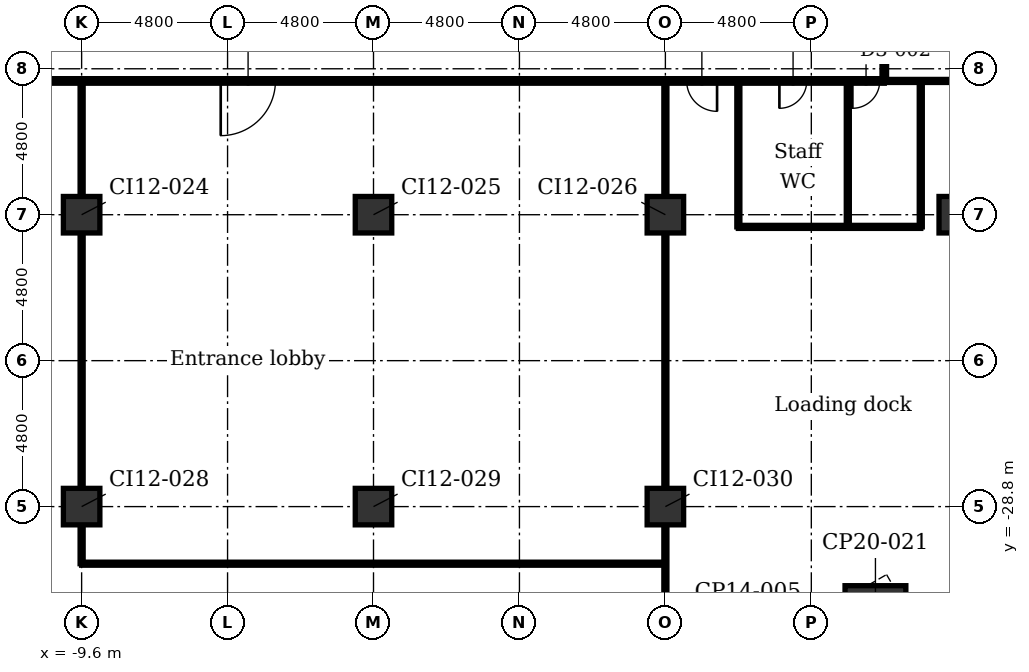
"""IFC4 building model, lengths in metres.
Left out: names, types, materials, properties, quantities, classifications, styles, units other than length and angle.
Written with IfcOpenShell. Run it as: python <this file> out.ifc"""

import sys

from ifc_helpers import new_model, si_unit, direction, frame, frame_2d, origin, origin_2d, place, context, subcontext, project, spatial, rectangle, extrude, element, fill, save


model = new_model("IFC4")
c1 = context("Model", 3, precision=1e-05, world=origin(), true_north=direction((0.0, 1.0)))
c2 = subcontext(c1, "Body", "Model", "MODEL_VIEW")
j1 = project(units=[si_unit("LENGTHUNIT", "METRE"), si_unit("PLANEANGLEUNIT", "RADIAN")], contexts=[c1])
p1 = place(None, origin())
s1 = spatial("IfcSite", under=j1, at=p1, CompositionType="ELEMENT")
p2 = place(p1, origin())
s2 = spatial("IfcBuilding", under=s1, at=p2, CompositionType="ELEMENT")
p3 = place(p2, origin())
s3 = spatial("IfcBuildingStorey", under=s2, at=p3, CompositionType="ELEMENT", Elevation=0.0)
p4 = place(p3, frame((16.509, -32.401, -0.4), z_axis=(0.0, 0.0, 1.0), x_axis=(0.866025403784, 0.5, 0.0)))
e1 = element("IfcColumn", 1, at=p4, inside=s3, PredefinedType="COLUMN", context=c2, shape_type="SweptSolid", body=[
    extrude(rectangle(XDim=2.0, YDim=2.0, at=origin_2d()), origin(), (0.0, 0.0, 1.0), 7.1),
])
for number, where, z_axis, x_axis in (
    (2, (-9.6, -28.8, -0.4), (0.0, 0.0, 1.0), (1.0, 0.0, 0.0)),
    (3, (-9.6, -19.2, -0.4), (0.0, 0.0, 1.0), (1.0, 0.0, 0.0)),
    (4, (0.0, -28.8, -0.4), (0.0, 0.0, 1.0), (1.0, 0.0, 0.0)),
    (5, (0.0, -19.2, -0.4), (0.0, 0.0, 1.0), (1.0, 0.0, 0.0)),
    (6, (9.6, -28.8, -0.4), (0.0, 0.0, 1.0), (1.0, 0.0, 0.0)),
    (7, (9.6, -19.2, -0.4), (0.0, 0.0, 1.0), (1.0, 0.0, 0.0)),
    (8, (19.2, -19.2, -0.4), (0.0, 0.0, 1.0), (1.0, 0.0, 0.0)),
):
    element("IfcColumn", number, at=place(p3, frame(where, z_axis=z_axis, x_axis=x_axis)), inside=s3, PredefinedType="COLUMN", context=c2, shape_type="SweptSolid", body=[
        extrude(rectangle(XDim=1.2, YDim=1.2, at=origin_2d()), origin(), (0.0, 0.0, 1.0), 7.1),
    ])
p5 = place(p3, frame((18.0, -19.6, 0.0), z_axis=(0.0, 0.0, 1.0), x_axis=(0.0, 1.0, 0.0)))
e9 = element("IfcWall", 9, at=p5, inside=s3, PredefinedType="PARTITIONING", context=c2, shape_type="SweptSolid", body=[
    extrude(rectangle(XDim=4.8, YDim=0.1, at=frame_2d((2.4, 0.0))), origin(), (0.0, 0.0, 1.0), 6.7),
])
p6 = place(p3, frame((16.8, -14.8, 0.0), z_axis=(0.0, 0.0, 1.0), x_axis=(0.0, 1.0, 0.0)))
e10 = element("IfcWall", 10, at=p6, inside=s3, PredefinedType="PARTITIONING", context=c2, shape_type="SweptSolid", body=[
    extrude(rectangle(XDim=10.85, YDim=0.15, at=frame_2d((5.425, 0.0))), origin(), (0.0, 0.0, 1.0), 6.7),
])
p7 = place(p6, frame((1.9, 0.0, 0.0)))
e11 = element("IfcOpeningElement", 11, at=p7, cuts=e10, PredefinedType="OPENING", context=c2, shape_type="SweptSolid", body=[
    extrude(rectangle(XDim=1.0, YDim=2.1, at=frame_2d((0.5, 1.05))), frame((0.0, 0.085, 0.0), z_axis=(0.0, -1.0, 0.0), x_axis=(1.0, 0.0, 0.0)), (0.0, 0.0, 1.0), 0.17),
])
p8 = place(p6, frame((8.9, 0.0, 0.0)))
e12 = element("IfcOpeningElement", 12, at=p8, cuts=e10, PredefinedType="OPENING", context=c2, shape_type="SweptSolid", body=[
    extrude(rectangle(XDim=1.0, YDim=2.1, at=frame_2d((0.5, 1.05))), frame((0.0, 0.085, 0.0), z_axis=(0.0, -1.0, 0.0), x_axis=(1.0, 0.0, 0.0)), (0.0, 0.0, 1.0), 0.17),
])
for number, where, z_axis, x_axis in (
    (13, (15.6, -19.6, 0.0), (0.0, 0.0, 1.0), (0.0, 1.0, 0.0)),
    (14, (12.0, -19.6, 0.0), (0.0, 0.0, 1.0), (0.0, 1.0, 0.0)),
):
    element("IfcWall", number, at=place(p3, frame(where, z_axis=z_axis, x_axis=x_axis)), inside=s3, PredefinedType="PARTITIONING", context=c2, shape_type="SweptSolid", body=[
        extrude(rectangle(XDim=4.8, YDim=0.1, at=frame_2d((2.4, 0.0))), origin(), (0.0, 0.0, 1.0), 6.7),
    ])
p9 = place(p3, frame((9.6, -28.24, 0.0), z_axis=(0.0, 0.0, 1.0), x_axis=(0.0, 1.0, 0.0)))
e15 = element("IfcWall", 15, at=p9, inside=s3, PredefinedType="PARTITIONING", context=c2, shape_type="SweptSolid", body=[
    extrude(rectangle(XDim=8.48, YDim=0.1, at=frame_2d((4.24, 0.0))), origin(), (0.0, 0.0, 1.0), 6.293),
])
p10 = place(p3, frame((9.6, -31.896, 0.0), z_axis=(0.0, 0.0, 1.0), x_axis=(0.0, 1.0, 0.0)))
e16 = element("IfcWall", 16, at=p10, inside=s3, PredefinedType="PARTITIONING", context=c2, shape_type="SweptSolid", body=[
    extrude(rectangle(XDim=2.535, YDim=0.1, at=frame_2d((1.268, 0.0))), origin(), (0.0, 0.0, 1.0), 6.39),
])
for number, where, z_axis, x_axis in (
    (17, (9.6, -29.36, 0.0), (0.0, 0.0, 1.0), (0.0, 1.0, 0.0)),
    (18, (9.6, -19.76, 0.0), (0.0, 0.0, 1.0), (0.0, 1.0, 0.0)),
):
    element("IfcWall", number, at=place(p3, frame(where, z_axis=z_axis, x_axis=x_axis)), inside=s3, PredefinedType="PARTITIONING", context=c2, shape_type="SweptSolid", body=[
        extrude(rectangle(XDim=1.12, YDim=0.1, at=frame_2d((0.56, 0.0))), origin(), (0.0, 0.0, 1.0), 6.7),
    ])
p11 = place(p3, frame((9.6, -18.64, 0.0), z_axis=(0.0, 0.0, 1.0), x_axis=(0.0, 1.0, 0.0)))
e19 = element("IfcWall", 19, at=p11, inside=s3, PredefinedType="PARTITIONING", context=c2, shape_type="SweptSolid", body=[
    extrude(rectangle(XDim=3.84, YDim=0.1, at=frame_2d((1.92, 0.0))), origin(), (0.0, 0.0, 1.0), 6.293),
])
p12 = place(p3, frame((-9.6, -28.24, 0.0), z_axis=(0.0, 0.0, 1.0), x_axis=(0.0, 1.0, 0.0)))
e20 = element("IfcWall", 20, at=p12, inside=s3, PredefinedType="PARTITIONING", context=c2, shape_type="SweptSolid", body=[
    extrude(rectangle(XDim=8.48, YDim=0.1, at=frame_2d((4.24, 0.0))), origin(), (0.0, 0.0, 1.0), 6.293),
])
p13 = place(p3, frame((-9.6, -30.678, 0.0), z_axis=(0.0, 0.0, 1.0), x_axis=(0.0, 1.0, 0.0)))
e21 = element("IfcWall", 21, at=p13, inside=s3, PredefinedType="PARTITIONING", context=c2, shape_type="SweptSolid", body=[
    extrude(rectangle(XDim=1.318, YDim=0.1, at=frame_2d((0.659, 0.0))), origin(), (0.0, 0.0, 1.0), 6.39),
])
for number, where, z_axis, x_axis in (
    (22, (-9.6, -29.36, 0.0), (0.0, 0.0, 1.0), (0.0, 1.0, 0.0)),
    (23, (-9.6, -19.76, 0.0), (0.0, 0.0, 1.0), (0.0, 1.0, 0.0)),
):
    element("IfcWall", number, at=place(p3, frame(where, z_axis=z_axis, x_axis=x_axis)), inside=s3, PredefinedType="PARTITIONING", context=c2, shape_type="SweptSolid", body=[
        extrude(rectangle(XDim=1.12, YDim=0.1, at=frame_2d((0.56, 0.0))), origin(), (0.0, 0.0, 1.0), 6.7),
    ])
p14 = place(p3, frame((-9.6, -18.64, 0.0), z_axis=(0.0, 0.0, 1.0), x_axis=(0.0, 1.0, 0.0)))
e24 = element("IfcWall", 24, at=p14, inside=s3, PredefinedType="PARTITIONING", context=c2, shape_type="SweptSolid", body=[
    extrude(rectangle(XDim=3.84, YDim=0.1, at=frame_2d((1.92, 0.0))), origin(), (0.0, 0.0, 1.0), 6.293),
])
p15 = place(p3, frame((-9.6, -30.678, 0.0), z_axis=(0.0, 0.0, 1.0), x_axis=(1.0, 0.0, 0.0)))
e25 = element("IfcWall", 25, at=p15, inside=s3, PredefinedType="PARTITIONING", context=c2, shape_type="SweptSolid", body=[
    extrude(rectangle(XDim=19.2, YDim=0.1, at=frame_2d((9.6, 0.0))), origin(), (0.0, 0.0, 1.0), 6.7),
])
p16 = place(p3, frame((12.0, -19.6, 0.0), z_axis=(0.0, 0.0, 1.0), x_axis=(1.0, 0.0, 0.0)))
e26 = element("IfcWall", 26, at=p16, inside=s3, PredefinedType="PARTITIONING", context=c2, shape_type="SweptSolid", body=[
    extrude(rectangle(XDim=6.0, YDim=0.1, at=frame_2d((3.0, 0.0))), origin(), (0.0, 0.0, 1.0), 6.7),
])
p17 = place(p3, frame((16.8, -14.8, 0.0), z_axis=(0.0, 0.0, 1.0), x_axis=(1.0, 0.0, 0.0)))
e27 = element("IfcWall", 27, at=p17, inside=s3, PredefinedType="PARTITIONING", context=c2, shape_type="SweptSolid", body=[
    extrude(rectangle(XDim=4.8, YDim=0.1, at=frame_2d((2.4, 0.0))), origin(), (0.0, 0.0, 1.0), 6.7),
])
p18 = place(p3, frame((-16.8, -14.8, 0.0), z_axis=(0.0, 0.0, 1.0), x_axis=(1.0, 0.0, 0.0)))
e28 = element("IfcWall", 28, at=p18, inside=s3, PredefinedType="PARTITIONING", context=c2, shape_type="SweptSolid", body=[
    extrude(rectangle(XDim=33.6, YDim=0.15, at=frame_2d((16.8, 0.0))), origin(), (0.0, 0.0, 1.0), 6.7),
])
p19 = place(p18, frame((30.15, 0.0, 0.0)))
e29 = element("IfcOpeningElement", 29, at=p19, cuts=e28, PredefinedType="OPENING", context=c2, shape_type="SweptSolid", body=[
    extrude(rectangle(XDim=0.9, YDim=2.1, at=frame_2d((0.45, 1.05))), frame((0.0, 0.085, 0.0), z_axis=(0.0, -1.0, 0.0), x_axis=(1.0, 0.0, 0.0)), (0.0, 0.0, 1.0), 0.17),
])
p20 = place(p18, frame((32.55, 0.0, 0.0)))
e30 = element("IfcOpeningElement", 30, at=p20, cuts=e28, PredefinedType="OPENING", context=c2, shape_type="SweptSolid", body=[
    extrude(rectangle(XDim=0.9, YDim=2.1, at=frame_2d((0.45, 1.05))), frame((0.0, 0.085, 0.0), z_axis=(0.0, -1.0, 0.0), x_axis=(1.0, 0.0, 0.0)), (0.0, 0.0, 1.0), 0.17),
])
p21 = place(p18, frame((2.025, 0.0, 0.0)))
e31 = element("IfcOpeningElement", 31, at=p21, cuts=e28, PredefinedType="OPENING", context=c2, shape_type="SweptSolid", body=[
    extrude(rectangle(XDim=1.8, YDim=2.1, at=frame_2d((0.9, 1.05))), frame((0.0, 0.085, 0.0), z_axis=(0.0, -1.0, 0.0), x_axis=(1.0, 0.0, 0.0)), (0.0, 0.0, 1.0), 0.17),
])
p22 = place(p18, frame((11.775, 0.0, 0.0)))
e32 = element("IfcOpeningElement", 32, at=p22, cuts=e28, PredefinedType="OPENING", context=c2, shape_type="SweptSolid", body=[
    extrude(rectangle(XDim=1.8, YDim=2.1, at=frame_2d((0.9, 1.05))), frame((0.0, 0.085, 0.0), z_axis=(0.0, -1.0, 0.0), x_axis=(1.0, 0.0, 0.0)), (0.0, 0.0, 1.0), 0.17),
])
p23 = place(p18, frame((27.1, 0.0, 0.0)))
e33 = element("IfcOpeningElement", 33, at=p23, cuts=e28, PredefinedType="OPENING", context=c2, shape_type="SweptSolid", body=[
    extrude(rectangle(XDim=1.0, YDim=2.1, at=frame_2d((0.5, 1.05))), frame((0.0, 0.085, 0.0), z_axis=(0.0, -1.0, 0.0), x_axis=(1.0, 0.0, 0.0)), (0.0, 0.0, 1.0), 0.17),
])
p24 = place(p19, frame((0.9, 0.0, 0.0), z_axis=(0.0, 0.0, 1.0), x_axis=(-1.0, 0.0, 0.0)))
e34 = element("IfcDoor", 34, at=p24, inside=s3, OperationType="SINGLE_SWING_LEFT", PredefinedType="DOOR", context=c2, shape_type="SweptSolid", body=[
    extrude(rectangle(XDim=0.9, YDim=2.1, at=frame_2d((0.45, 1.05))), frame((0.0, 0.025, 0.0), z_axis=(0.0, -1.0, 0.0), x_axis=(1.0, 0.0, 0.0)), (0.0, 0.0, 1.0), 0.05),
])
fill(e29, e34)
p25 = place(p20, frame((0.9, 0.0, 0.0), z_axis=(0.0, 0.0, 1.0), x_axis=(-1.0, 0.0, 0.0)))
e35 = element("IfcDoor", 35, at=p25, inside=s3, OperationType="SINGLE_SWING_LEFT", PredefinedType="DOOR", context=c2, shape_type="SweptSolid", body=[
    extrude(rectangle(XDim=0.9, YDim=2.1, at=frame_2d((0.45, 1.05))), frame((0.0, 0.025, 0.0), z_axis=(0.0, -1.0, 0.0), x_axis=(1.0, 0.0, 0.0)), (0.0, 0.0, 1.0), 0.05),
])
fill(e30, e35)
p26 = place(p22, frame((1.8, 0.0, 0.0), z_axis=(0.0, 0.0, 1.0), x_axis=(-1.0, 0.0, 0.0)))
e36 = element("IfcDoor", 36, at=p26, inside=s3, OperationType="SINGLE_SWING_LEFT", PredefinedType="DOOR", context=c2, shape_type="SweptSolid", body=[
    extrude(rectangle(XDim=1.8, YDim=2.1, at=frame_2d((0.9, 1.05))), frame((0.0, 0.025, 0.0), z_axis=(0.0, -1.0, 0.0), x_axis=(1.0, 0.0, 0.0)), (0.0, 0.0, 1.0), 0.05),
])
fill(e32, e36)
p27 = place(p23, frame((1.0, 0.0, 0.0), z_axis=(0.0, 0.0, 1.0), x_axis=(-1.0, 0.0, 0.0)))
e37 = element("IfcDoor", 37, at=p27, inside=s3, OperationType="SINGLE_SWING_RIGHT", PredefinedType="DOOR", context=c2, shape_type="SweptSolid", body=[
    extrude(rectangle(XDim=1.0, YDim=2.1, at=frame_2d((0.5, 1.05))), frame((0.0, 0.025, 0.0), z_axis=(0.0, -1.0, 0.0), x_axis=(1.0, 0.0, 0.0)), (0.0, 0.0, 1.0), 0.05),
])
fill(e33, e37)
save(model, sys.argv[1])
